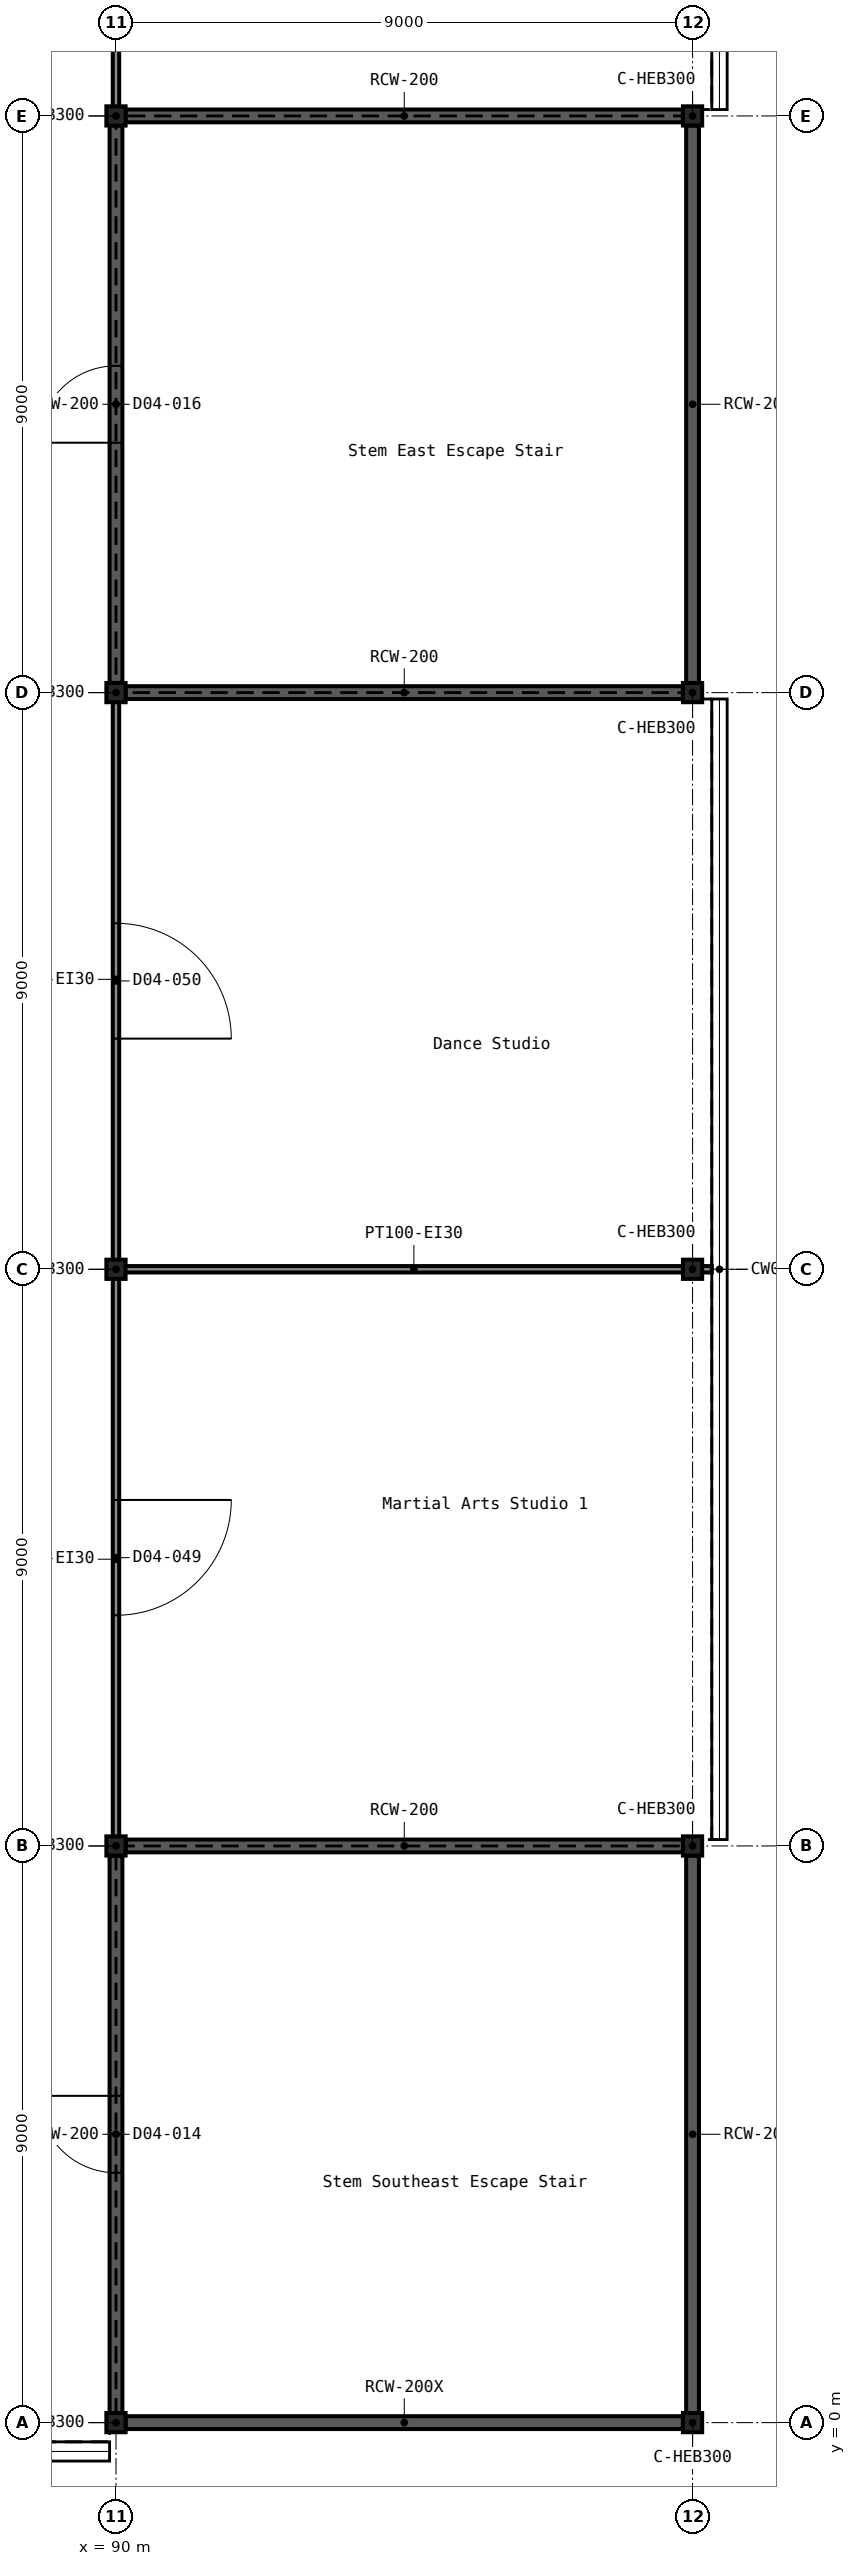
"""IFC4 building model, lengths in metres.
Left out: names, types, materials, properties, quantities, classifications, styles, units other than length and angle.
Written with IfcOpenShell. Run it as: python <this file> out.ifc"""

import sys

from ifc_helpers import new_model, si_unit, direction, frame, frame_2d, origin, origin_2d, place, context, subcontext, project, spatial, rectangle, i_section, extrude, element, fill, save


model = new_model("IFC4")
c1 = context("Model", 3, precision=1e-05, world=origin(), true_north=direction((0.0, 1.0)))
c2 = subcontext(c1, "Body", "Model", "MODEL_VIEW")
j1 = project(units=[si_unit("LENGTHUNIT", "METRE"), si_unit("PLANEANGLEUNIT", "RADIAN")], contexts=[c1])
p1 = place(None, origin())
s1 = spatial("IfcSite", under=j1, at=p1, CompositionType="ELEMENT")
p2 = place(p1, origin())
s2 = spatial("IfcBuilding", under=s1, at=p2, CompositionType="ELEMENT")
p3 = place(p2, frame((0.0, 0.0, 21.6)))
s3 = spatial("IfcBuildingStorey", under=s2, at=p3, CompositionType="ELEMENT", Elevation=21.6)
for number, where, z_axis, x_axis in (
    (1, (90.0, 0.0, 0.0), (0.0, 0.0, 1.0), (0.0, 1.0, 0.0)),
    (2, (99.0, 0.0, 0.0), (0.0, 0.0, 1.0), (0.0, 1.0, 0.0)),
    (3, (90.0, 9.0, 0.0), (0.0, 0.0, 1.0), (1.0, 0.0, 0.0)),
    (4, (99.0, 9.0, 0.0), (0.0, 0.0, 1.0), (0.0, 1.0, 0.0)),
    (5, (90.0, 18.0, 0.0), (0.0, 0.0, 1.0), (1.0, 0.0, 0.0)),
    (6, (99.0, 18.0, 0.0), (0.0, 0.0, 1.0), (0.0, 1.0, 0.0)),
    (7, (90.0, 27.0, 0.0), (0.0, 0.0, 1.0), (1.0, 0.0, 0.0)),
    (8, (99.0, 27.0, 0.0), (0.0, 0.0, 1.0), (0.0, 1.0, 0.0)),
    (9, (90.0, 36.0, 0.0), (0.0, 0.0, 1.0), (1.0, 0.0, 0.0)),
    (10, (99.0, 36.0, 0.0), (0.0, 0.0, 1.0), (0.0, 1.0, 0.0)),
):
    element("IfcColumn", number, at=place(p3, frame(where, z_axis=z_axis, x_axis=x_axis)), inside=s3, PredefinedType="COLUMN", context=c2, shape_type="SweptSolid", body=[
        extrude(i_section(OverallWidth=0.3, OverallDepth=0.3, WebThickness=0.011, FlangeThickness=0.019, FilletRadius=0.027, at=origin_2d()), origin(), (0.0, 0.0, 1.0), 5.4),
    ])
for number, where, z_axis, x_axis in (
    (11, (90.15, 0.0, 0.0), (0.0, 0.0, 1.0), (1.0, 0.0, 0.0)),
    (12, (90.15, 9.0, 0.0), (0.0, 0.0, 1.0), (1.0, 0.0, 0.0)),
):
    element("IfcWall", number, at=place(p3, frame(where, z_axis=z_axis, x_axis=x_axis)), inside=s3, PredefinedType="SHEAR", context=c2, shape_type="SweptSolid", body=[
        extrude(rectangle(XDim=8.7, YDim=0.2, at=frame_2d((4.35, 0.0))), origin(), (0.0, 0.0, 1.0), 5.4),
    ])
p4 = place(p3, frame((90.0, 0.15, 0.0), z_axis=(0.0, 0.0, 1.0), x_axis=(0.0, 1.0, 0.0)))
e13 = element("IfcWall", 13, at=p4, inside=s3, PredefinedType="SHEAR", context=c2, shape_type="SweptSolid", body=[
    extrude(rectangle(XDim=8.7, YDim=0.2, at=frame_2d((4.35, 0.0))), origin(), (0.0, 0.0, 1.0), 5.4),
])
p5 = place(p4, frame((3.75, 0.0, 0.0)))
e14 = element("IfcOpeningElement", 14, at=p5, cuts=e13, PredefinedType="OPENING", context=c2, shape_type="SweptSolid", body=[
    extrude(rectangle(XDim=1.2, YDim=2.1, at=frame_2d((0.6, 1.05))), frame((0.0, 0.111, 0.0), z_axis=(0.0, -1.0, 0.0), x_axis=(1.0, 0.0, 0.0)), (0.0, 0.0, 1.0), 0.222),
])
for number, where, z_axis, x_axis in (
    (15, (99.0, 0.15, 0.0), (0.0, 0.0, 1.0), (0.0, 1.0, 0.0)),
    (16, (90.15, 27.0, 0.0), (0.0, 0.0, 1.0), (1.0, 0.0, 0.0)),
    (17, (90.15, 36.0, 0.0), (0.0, 0.0, 1.0), (1.0, 0.0, 0.0)),
):
    element("IfcWall", number, at=place(p3, frame(where, z_axis=z_axis, x_axis=x_axis)), inside=s3, PredefinedType="SHEAR", context=c2, shape_type="SweptSolid", body=[
        extrude(rectangle(XDim=8.7, YDim=0.2, at=frame_2d((4.35, 0.0))), origin(), (0.0, 0.0, 1.0), 5.4),
    ])
p6 = place(p3, frame((90.0, 27.15, 0.0), z_axis=(0.0, 0.0, 1.0), x_axis=(0.0, 1.0, 0.0)))
e18 = element("IfcWall", 18, at=p6, inside=s3, PredefinedType="SHEAR", context=c2, shape_type="SweptSolid", body=[
    extrude(rectangle(XDim=8.7, YDim=0.2, at=frame_2d((4.35, 0.0))), origin(), (0.0, 0.0, 1.0), 5.4),
])
p7 = place(p6, frame((3.75, 0.0, 0.0)))
e19 = element("IfcOpeningElement", 19, at=p7, cuts=e18, PredefinedType="OPENING", context=c2, shape_type="SweptSolid", body=[
    extrude(rectangle(XDim=1.2, YDim=2.1, at=frame_2d((0.6, 1.05))), frame((0.0, 0.111, 0.0), z_axis=(0.0, -1.0, 0.0), x_axis=(1.0, 0.0, 0.0)), (0.0, 0.0, 1.0), 0.222),
])
p8 = place(p3, frame((99.0, 27.15, 0.0), z_axis=(0.0, 0.0, 1.0), x_axis=(0.0, 1.0, 0.0)))
e20 = element("IfcWall", 20, at=p8, inside=s3, PredefinedType="SHEAR", context=c2, shape_type="SweptSolid", body=[
    extrude(rectangle(XDim=8.7, YDim=0.2, at=frame_2d((4.35, 0.0))), origin(), (0.0, 0.0, 1.0), 5.4),
])
p9 = place(p3, frame((90.0, 18.0, 0.0), z_axis=(0.0, 0.0, 1.0), x_axis=(1.0, 0.0, 0.0)))
e21 = element("IfcWall", 21, at=p9, inside=s3, PredefinedType="PARTITIONING", context=c2, shape_type="SweptSolid", body=[
    extrude(rectangle(XDim=9.3, YDim=0.1, at=frame_2d((4.65, 0.0))), origin(), (0.0, 0.0, 1.0), 5.4),
])
p10 = place(p3, frame((90.0, 9.0, 0.0), z_axis=(0.0, 0.0, 1.0), x_axis=(0.0, 1.0, 0.0)))
e22 = element("IfcWall", 22, at=p10, inside=s3, PredefinedType="PARTITIONING", context=c2, shape_type="SweptSolid", body=[
    extrude(rectangle(XDim=8.95, YDim=0.1, at=frame_2d((4.475, 0.0))), origin(), (0.0, 0.0, 1.0), 5.4),
])
p11 = place(p10, frame((3.6, 0.0, 0.0)))
e23 = element("IfcOpeningElement", 23, at=p11, cuts=e22, PredefinedType="OPENING", context=c2, shape_type="SweptSolid", body=[
    extrude(rectangle(XDim=1.8, YDim=2.1, at=frame_2d((0.9, 1.05))), frame((0.0, 0.061, 0.0), z_axis=(0.0, -1.0, 0.0), x_axis=(1.0, 0.0, 0.0)), (0.0, 0.0, 1.0), 0.122),
])
p12 = place(p3, frame((90.0, 18.05, 0.0), z_axis=(0.0, 0.0, 1.0), x_axis=(0.0, 1.0, 0.0)))
e24 = element("IfcWall", 24, at=p12, inside=s3, PredefinedType="PARTITIONING", context=c2, shape_type="SweptSolid", body=[
    extrude(rectangle(XDim=8.95, YDim=0.1, at=frame_2d((4.475, 0.0))), origin(), (0.0, 0.0, 1.0), 5.4),
])
p13 = place(p12, frame((3.55, 0.0, 0.0)))
e25 = element("IfcOpeningElement", 25, at=p13, cuts=e24, PredefinedType="OPENING", context=c2, shape_type="SweptSolid", body=[
    extrude(rectangle(XDim=1.8, YDim=2.1, at=frame_2d((0.9, 1.05))), frame((0.0, 0.061, 0.0), z_axis=(0.0, -1.0, 0.0), x_axis=(1.0, 0.0, 0.0)), (0.0, 0.0, 1.0), 0.122),
])
p14 = place(p3, frame((90.0, 36.0, 0.0), z_axis=(0.0, 0.0, 1.0), x_axis=(0.0, 1.0, 0.0)))
e26 = element("IfcWall", 26, at=p14, inside=s3, PredefinedType="PARTITIONING", context=c2, shape_type="SweptSolid", body=[
    extrude(rectangle(XDim=9.0, YDim=0.1, at=frame_2d((4.5, 0.0))), origin(), (0.0, 0.0, 1.0), 5.4),
])
p15 = place(p14, frame((3.9, 0.0, 0.0)))
e27 = element("IfcOpeningElement", 27, at=p15, cuts=e26, PredefinedType="OPENING", context=c2, shape_type="SweptSolid", body=[
    extrude(rectangle(XDim=1.2, YDim=2.1, at=frame_2d((0.6, 1.05))), frame((0.0, 0.061, 0.0), z_axis=(0.0, -1.0, 0.0), x_axis=(1.0, 0.0, 0.0)), (0.0, 0.0, 1.0), 0.122),
])
p16 = place(p5, origin())
e28 = element("IfcDoor", 28, at=p16, inside=s3, OperationType="SINGLE_SWING_RIGHT", PredefinedType="DOOR", context=c2, shape_type="SweptSolid", body=[
    extrude(rectangle(XDim=1.2, YDim=2.1, at=frame_2d((0.6, 1.05))), frame((0.0, 0.025, 0.0), z_axis=(0.0, -1.0, 0.0), x_axis=(1.0, 0.0, 0.0)), (0.0, 0.0, 1.0), 0.05),
])
fill(e14, e28)
p17 = place(p7, origin())
e29 = element("IfcDoor", 29, at=p17, inside=s3, OperationType="SINGLE_SWING_LEFT", PredefinedType="DOOR", context=c2, shape_type="SweptSolid", body=[
    extrude(rectangle(XDim=1.2, YDim=2.1, at=frame_2d((0.6, 1.05))), frame((0.0, 0.025, 0.0), z_axis=(0.0, -1.0, 0.0), x_axis=(1.0, 0.0, 0.0)), (0.0, 0.0, 1.0), 0.05),
])
fill(e19, e29)
p18 = place(p11, frame((1.8, 0.0, 0.0), z_axis=(0.0, 0.0, 1.0), x_axis=(-1.0, 0.0, 0.0)))
e30 = element("IfcDoor", 30, at=p18, inside=s3, OperationType="DOUBLE_DOOR_SINGLE_SWING", PredefinedType="DOOR", context=c2, shape_type="SweptSolid", body=[
    extrude(rectangle(XDim=1.8, YDim=2.1, at=frame_2d((0.9, 1.05))), frame((0.0, 0.025, 0.0), z_axis=(0.0, -1.0, 0.0), x_axis=(1.0, 0.0, 0.0)), (0.0, 0.0, 1.0), 0.05),
])
fill(e23, e30)
p19 = place(p13, frame((1.8, 0.0, 0.0), z_axis=(0.0, 0.0, 1.0), x_axis=(-1.0, 0.0, 0.0)))
e31 = element("IfcDoor", 31, at=p19, inside=s3, OperationType="DOUBLE_DOOR_SINGLE_SWING", PredefinedType="DOOR", context=c2, shape_type="SweptSolid", body=[
    extrude(rectangle(XDim=1.8, YDim=2.1, at=frame_2d((0.9, 1.05))), frame((0.0, 0.025, 0.0), z_axis=(0.0, -1.0, 0.0), x_axis=(1.0, 0.0, 0.0)), (0.0, 0.0, 1.0), 0.05),
])
fill(e25, e31)
save(model, sys.argv[1])
